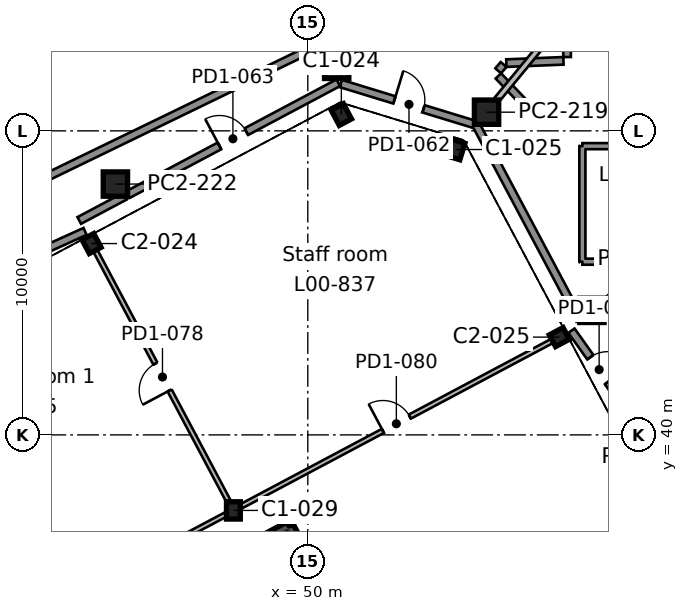
"""IFC4 building model, lengths in metres.
Left out: names, types, materials, properties, quantities, classifications, styles, units other than length and angle.
Written with IfcOpenShell. Run it as: python <this file> out.ifc"""

import sys

from ifc_helpers import new_model, si_unit, direction, frame, frame_2d, origin, origin_2d, place, context, subcontext, project, spatial, rectangle, i_section, extrude, element, fill, save


model = new_model("IFC4")
c1 = context("Model", 3, precision=1e-05, world=origin(), true_north=direction((0.0, 1.0)))
c2 = subcontext(c1, "Body", "Model", "MODEL_VIEW")
j1 = project(units=[si_unit("LENGTHUNIT", "METRE"), si_unit("PLANEANGLEUNIT", "RADIAN")], contexts=[c1])
p1 = place(None, origin())
s1 = spatial("IfcSite", under=j1, at=p1, CompositionType="ELEMENT")
p2 = place(p1, origin())
s2 = spatial("IfcBuilding", under=s1, at=p2, CompositionType="ELEMENT")
p3 = place(p2, origin())
s3 = spatial("IfcBuildingStorey", under=s2, at=p3, CompositionType="ELEMENT", Elevation=0.0)
p4 = place(p3, frame((47.553, 37.516, 0.0), z_axis=(0.0, 0.0, 1.0), x_axis=(1.0, 0.0, 0.0)))
e1 = element("IfcColumn", 1, at=p4, inside=s3, PredefinedType="COLUMN", context=c2, shape_type="SweptSolid", body=[
    extrude(i_section(OverallWidth=0.455, OverallDepth=0.569, WebThickness=0.078, FlangeThickness=0.125, FilletRadius=0.015, at=origin_2d()), origin(), (0.0, 0.0, 1.0), 7.0),
])
for number, where, z_axis, x_axis in (
    (2, (58.272, 43.216, 0.0), (0.0, 0.0, 1.0), (-0.469, 0.883, 0.0)),
    (3, (42.887, 46.293, 0.0), (0.0, 0.0, 1.0), (-0.883, -0.469, 0.0)),
):
    element("IfcColumn", number, at=place(p3, frame(where, z_axis=z_axis, x_axis=x_axis)), inside=s3, PredefinedType="COLUMN", context=c2, shape_type="SweptSolid", body=[
        extrude(i_section(OverallWidth=0.437, OverallDepth=0.513, WebThickness=0.061, FlangeThickness=0.097, FilletRadius=0.015, at=origin_2d()), origin(), (0.0, 0.0, 1.0), 7.0),
    ])
for number, where, z_axis, x_axis in (
    (4, (54.867, 49.386, 0.0), (0.0, 0.0, 1.0), (-0.956, 0.292, 0.0)),
    (5, (51.103, 50.537, 0.0), (0.0, 0.0, 1.0), (-0.883, -0.469, 0.0)),
):
    element("IfcColumn", number, at=place(p3, frame(where, z_axis=z_axis, x_axis=x_axis)), inside=s3, PredefinedType="COLUMN", context=c2, shape_type="SweptSolid", body=[
        extrude(i_section(OverallWidth=0.455, OverallDepth=0.569, WebThickness=0.078, FlangeThickness=0.125, FilletRadius=0.015, at=origin_2d()), origin(), (0.0, 0.0, 1.0), 7.0),
    ])
p5 = place(p3, frame((49.384, 37.004, 0.0), z_axis=(0.0, 0.0, 1.0), x_axis=(0.46946936446, -0.882948761726, 0.0)))
e6 = element("IfcWall", 6, at=p5, inside=s3, PredefinedType="SHEAR", context=c2, shape_type="SweptSolid", body=[
    extrude(rectangle(XDim=3.75, YDim=0.3, at=frame_2d((1.875, 0.0))), origin(), (0.0, 0.0, 1.0), 7.0),
])
p6 = place(p3, frame((42.055, 33.107, 0.0), z_axis=(0.0, 0.0, 1.0), x_axis=(0.882945809314, 0.469474917132, 0.0)))
e7 = element("IfcWall", 7, at=p6, inside=s3, PredefinedType="SHEAR", context=c2, shape_type="SweptSolid", body=[
    extrude(rectangle(XDim=8.3, YDim=0.3, at=frame_2d((4.15, 0.0))), origin(), (0.0, 0.0, 1.0), 7.0),
])
for number, where, z_axis, x_axis in (
    (8, (59.345, 44.096, 0.0), (0.0, 0.0, 1.0), (1.0, 0.0, 0.0)),
    (9, (43.672, 48.25, 0.0), (0.0, 0.0, 1.0), (1.0, 0.0, 0.0)),
    (10, (55.879, 50.614, 0.0), (0.0, 0.0, 1.0), (1.0, 0.0, 0.0)),
    (11, (50.95, 52.121, 0.0), (0.0, 0.0, 1.0), (1.0, 0.0, 0.0)),
):
    element("IfcColumn", number, at=place(p3, frame(where, z_axis=z_axis, x_axis=x_axis)), inside=s3, PredefinedType="COLUMN", context=c2, shape_type="SweptSolid", body=[
        extrude(rectangle(XDim=0.8, YDim=0.8, at=origin_2d()), origin(), (0.0, 0.0, 1.0), 6.37),
    ])
p7 = place(p3, frame((64.104, 50.899, 7.0), z_axis=(0.0, 0.0, 1.0), x_axis=(-0.999557331357, -0.029751324843, 0.0)))
e12 = element("IfcWall", 12, at=p7, inside=s3, PredefinedType="STANDARD", context=c2, shape_type="SweptSolid", body=[
    extrude(rectangle(XDim=6.721, YDim=0.25, at=frame_2d((3.36, 0.0))), origin(), (0.0, 0.0, 1.0), 0.65),
])
p8 = place(p3, frame((57.292, 50.737, 7.0), z_axis=(0.0, 0.0, 1.0), x_axis=(-0.692037764772, 0.721861297016, 0.0)))
e13 = element("IfcWall", 13, at=p8, inside=s3, PredefinedType="STANDARD", context=c2, shape_type="SweptSolid", body=[
    extrude(rectangle(XDim=1.482, YDim=0.25, at=frame_2d((0.741, 0.0))), origin(), (0.0, 0.0, 1.0), 0.65),
])
p9 = place(p3, frame((56.262, 51.974, 7.0), z_axis=(0.0, 0.0, 1.0), x_axis=(0.646899057013, 0.762575642173, 0.0)))
e14 = element("IfcWall", 14, at=p9, inside=s3, PredefinedType="STANDARD", context=c2, shape_type="SweptSolid", body=[
    extrude(rectangle(XDim=0.274, YDim=0.25, at=frame_2d((0.137, 0.0))), origin(), (0.0, 0.0, 1.0), 0.65),
])
p10 = place(p3, frame((56.53, 52.228, 7.0), z_axis=(0.0, 0.0, 1.0), x_axis=(0.999199505682, 0.040004347816, 0.0)))
e15 = element("IfcWall", 15, at=p10, inside=s3, PredefinedType="STANDARD", context=c2, shape_type="SweptSolid", body=[
    extrude(rectangle(XDim=1.88, YDim=0.25, at=frame_2d((0.94, 0.0))), origin(), (0.0, 0.0, 1.0), 0.65),
])
p11 = place(p3, frame((58.528, 52.428, 7.0), z_axis=(0.0, 0.0, 1.0), x_axis=(-0.001096104254, 0.999999399278, 0.0)))
e16 = element("IfcWall", 16, at=p11, inside=s3, PredefinedType="STANDARD", context=c2, shape_type="SweptSolid", body=[
    extrude(rectangle(XDim=6.237, YDim=0.25, at=frame_2d((3.118, 0.0))), origin(), (0.0, 0.0, 1.0), 0.65),
])
p12 = place(p3, frame((51.808, 53.523, 7.0), z_axis=(0.0, 0.0, 1.0), x_axis=(-0.89970966322, -0.436488856569, 0.0)))
e17 = element("IfcWall", 17, at=p12, inside=s3, PredefinedType="STANDARD", context=c2, shape_type="SweptSolid", body=[
    extrude(rectangle(XDim=13.462, YDim=0.25, at=frame_2d((6.731, 0.0))), origin(), (0.0, 0.0, 1.0), 0.65),
])
for number, where, z_axis, x_axis in (
    (18, (62.831, 45.697, 6.92), (0.0, 0.0, 1.0), (-1.0, 0.0, 0.0)),
    (19, (59.031, 45.697, 6.92), (0.0, 0.0, 1.0), (0.0, 1.0, 0.0)),
    (20, (59.031, 49.497, 6.92), (0.0, 0.0, 1.0), (1.0, 0.0, 0.0)),
):
    element("IfcWall", number, at=place(p3, frame(where, z_axis=z_axis, x_axis=x_axis)), inside=s3, PredefinedType="SOLIDWALL", context=c2, shape_type="SweptSolid", body=[
        extrude(rectangle(XDim=3.8, YDim=0.2, at=frame_2d((1.9, 0.0))), origin(), (0.0, 0.0, 1.0), 0.18),
    ])
p13 = place(p3, frame((62.503, 58.649, 0.0), z_axis=(0.0, 0.0, 1.0), x_axis=(-0.636071289124, -0.771630296938, 0.0)))
e21 = element("IfcWall", 21, at=p13, inside=s3, PredefinedType="PARTITIONING", context=c2, shape_type="SweptSolid", body=[
    extrude(rectangle(XDim=9.895, YDim=0.2, at=frame_2d((4.947, 0.0))), origin(), (0.0, 0.0, 1.0), 6.37),
])
p14 = place(p3, frame((58.672, 43.428, 0.0), z_axis=(0.0, 0.0, 1.0), x_axis=(0.578928632739, -0.815378217881, 0.0)))
e22 = element("IfcWall", 22, at=p14, inside=s3, PredefinedType="SOLIDWALL", context=c2, shape_type="SweptSolid", body=[
    extrude(rectangle(XDim=3.143, YDim=0.25, at=frame_2d((1.572, 0.0))), origin(), (0.0, 0.0, 1.0), 6.37),
])
p15 = place(p14, frame((1.072, 0.0, 0.0)))
e23 = element("IfcOpeningElement", 23, at=p15, cuts=e22, PredefinedType="OPENING", context=c2, shape_type="SweptSolid", body=[
    extrude(rectangle(XDim=1.0, YDim=2.1, at=frame_2d((0.5, 1.05))), frame((0.0, 0.135, 0.0), z_axis=(0.0, -1.0, 0.0), x_axis=(1.0, 0.0, 0.0)), (0.0, 0.0, 1.0), 0.27),
])
p16 = place(p3, frame((55.535, 50.196, 0.0), z_axis=(0.0, 0.0, 1.0), x_axis=(0.469471385401, -0.882947687176, 0.0)))
e24 = element("IfcWall", 24, at=p16, inside=s3, PredefinedType="SOLIDWALL", context=c2, shape_type="SweptSolid", body=[
    extrude(rectangle(XDim=7.264, YDim=0.25, at=frame_2d((3.632, 0.0))), origin(), (0.0, 0.0, 1.0), 6.37),
])
p17 = place(p3, frame((52.168, 61.898, 0.0), z_axis=(0.0, 0.0, 1.0), x_axis=(-0.100124403506, -0.994974926228, 0.0)))
e25 = element("IfcWall", 25, at=p17, inside=s3, PredefinedType="PARTITIONING", context=c2, shape_type="SweptSolid", body=[
    extrude(rectangle(XDim=9.424, YDim=0.2, at=frame_2d((4.712, 0.0))), origin(), (0.0, 0.0, 1.0), 6.37),
])
p18 = place(p3, frame((51.087, 51.556, 0.0), z_axis=(0.0, 0.0, 1.0), x_axis=(0.956310816829, -0.292351879788, 0.0)))
e26 = element("IfcWall", 26, at=p18, inside=s3, PredefinedType="SOLIDWALL", context=c2, shape_type="SweptSolid", body=[
    extrude(rectangle(XDim=4.651, YDim=0.25, at=frame_2d((2.326, 0.0))), origin(), (0.0, 0.0, 1.0), 6.37),
])
p19 = place(p18, frame((1.844, 0.0, 0.0)))
e27 = element("IfcOpeningElement", 27, at=p19, cuts=e26, PredefinedType="OPENING", context=c2, shape_type="SweptSolid", body=[
    extrude(rectangle(XDim=1.0, YDim=2.1, at=frame_2d((0.5, 1.05))), frame((0.0, 0.135, 0.0), z_axis=(0.0, -1.0, 0.0), x_axis=(1.0, 0.0, 0.0)), (0.0, 0.0, 1.0), 0.27),
])
p20 = place(p3, frame((36.793, 44.027, 0.0), z_axis=(0.0, 0.0, 1.0), x_axis=(0.910758391685, 0.412939646892, 0.0)))
e28 = element("IfcWall", 28, at=p20, inside=s3, PredefinedType="SOLIDWALL", context=c2, shape_type="SweptSolid", body=[
    extrude(rectangle(XDim=6.457, YDim=0.25, at=frame_2d((3.229, 0.0))), origin(), (0.0, 0.0, 1.0), 6.37),
])
p21 = place(p3, frame((42.483, 47.052, 0.0), z_axis=(0.0, 0.0, 1.0), x_axis=(0.882940813988, 0.469484311766, 0.0)))
e29 = element("IfcWall", 29, at=p21, inside=s3, PredefinedType="SOLIDWALL", context=c2, shape_type="SweptSolid", body=[
    extrude(rectangle(XDim=1.699, YDim=0.25, at=frame_2d((0.85, 0.0))), origin(), (0.0, 0.0, 1.0), 6.37),
])
p22 = place(p3, frame((44.072, 47.897, 0.0), z_axis=(0.0, 0.0, 1.0), x_axis=(0.882948932855, 0.469469042612, 0.0)))
e30 = element("IfcWall", 30, at=p22, inside=s3, PredefinedType="SOLIDWALL", context=c2, shape_type="SweptSolid", body=[
    extrude(rectangle(XDim=7.849, YDim=0.25, at=frame_2d((3.924, 0.0))), origin(), (0.0, 0.0, 1.0), 6.37),
])
p23 = place(p22, frame((3.424, 0.0, 0.0)))
e31 = element("IfcOpeningElement", 31, at=p23, cuts=e30, PredefinedType="OPENING", context=c2, shape_type="SweptSolid", body=[
    extrude(rectangle(XDim=1.0, YDim=2.1, at=frame_2d((0.5, 1.05))), frame((0.0, 0.135, 0.0), z_axis=(0.0, -1.0, 0.0), x_axis=(1.0, 0.0, 0.0)), (0.0, 0.0, 1.0), 0.27),
])
p24 = place(p3, frame((47.291, 37.376, 0.0), z_axis=(0.0, 0.0, 1.0), x_axis=(-0.882950155787, -0.469466742588, 0.0)))
e32 = element("IfcWall", 32, at=p24, inside=s3, PredefinedType="PARTITIONING", context=c2, shape_type="SweptSolid", body=[
    extrude(rectangle(XDim=8.002, YDim=0.15, at=frame_2d((4.001, 0.0))), origin(), (0.0, 0.0, 1.0), 6.55),
])
p25 = place(p3, frame((58.046, 43.095, 0.0), z_axis=(0.0, 0.0, 1.0), x_axis=(-0.882944872937, -0.469476678179, 0.0)))
e33 = element("IfcWall", 33, at=p25, inside=s3, PredefinedType="PARTITIONING", context=c2, shape_type="SweptSolid", body=[
    extrude(rectangle(XDim=11.586, YDim=0.15, at=frame_2d((5.793, 0.0))), origin(), (0.0, 0.0, 1.0), 6.55),
])
p26 = place(p25, frame((5.314, 0.0, 0.0)))
e34 = element("IfcOpeningElement", 34, at=p26, cuts=e33, PredefinedType="OPENING", context=c2, shape_type="SweptSolid", body=[
    extrude(rectangle(XDim=1.0, YDim=2.1, at=frame_2d((0.5, 1.05))), frame((0.0, 0.085, 0.0), z_axis=(0.0, -1.0, 0.0), x_axis=(1.0, 0.0, 0.0)), (0.0, 0.0, 1.0), 0.17),
])
p27 = place(p3, frame((47.385, 37.832, 0.0), z_axis=(0.0, 0.0, 1.0), x_axis=(-0.469472297485, 0.882947202212, 0.0)))
e35 = element("IfcWall", 35, at=p27, inside=s3, PredefinedType="PARTITIONING", context=c2, shape_type="SweptSolid", body=[
    extrude(rectangle(XDim=9.326, YDim=0.15, at=frame_2d((4.663, 0.0))), origin(), (0.0, 0.0, 1.0), 6.55),
])
p28 = place(p27, frame((4.112, 0.0, 0.0)))
e36 = element("IfcOpeningElement", 36, at=p28, cuts=e35, PredefinedType="OPENING", context=c2, shape_type="SweptSolid", body=[
    extrude(rectangle(XDim=1.0, YDim=2.1, at=frame_2d((0.5, 1.05))), frame((0.0, 0.085, 0.0), z_axis=(0.0, -1.0, 0.0), x_axis=(1.0, 0.0, 0.0)), (0.0, 0.0, 1.0), 0.17),
])
p29 = place(p3, frame((0.0, 0.0, 6.37)))
p30 = place(p29, frame((60.931, 47.597, 0.0)))
p31 = place(p30, frame((0.0, 0.0, 0.5)))
e37 = element("IfcWindow", 37, at=p31, inside=s3, PartitioningType="SINGLE_PANEL", PredefinedType="SKYLIGHT", context=c2, shape_type="SweptSolid", body=[
    extrude(rectangle(XDim=3.6, YDim=3.6, at=origin_2d()), origin(), (0.0, 0.0, 1.0), 0.05),
])
p32 = place(p26, frame((1.0, 0.0, 0.0), z_axis=(0.0, 0.0, 1.0), x_axis=(-1.0, 0.0, 0.0)))
e38 = element("IfcDoor", 38, at=p32, inside=s3, OperationType="SINGLE_SWING_LEFT", PredefinedType="DOOR", context=c2, shape_type="SweptSolid", body=[
    extrude(rectangle(XDim=1.0, YDim=2.1, at=frame_2d((0.5, 1.05))), frame((0.0, 0.025, 0.0), z_axis=(0.0, -1.0, 0.0), x_axis=(1.0, 0.0, 0.0)), (0.0, 0.0, 1.0), 0.05),
])
fill(e34, e38)
p33 = place(p15, origin())
e39 = element("IfcDoor", 39, at=p33, inside=s3, OperationType="SINGLE_SWING_RIGHT", PredefinedType="DOOR", context=c2, shape_type="SweptSolid", body=[
    extrude(rectangle(XDim=1.0, YDim=2.1, at=frame_2d((0.5, 1.05))), frame((0.0, 0.025, 0.0), z_axis=(0.0, -1.0, 0.0), x_axis=(1.0, 0.0, 0.0)), (0.0, 0.0, 1.0), 0.05),
])
fill(e23, e39)
p34 = place(p28, origin())
e40 = element("IfcDoor", 40, at=p34, inside=s3, OperationType="SINGLE_SWING_LEFT", PredefinedType="DOOR", context=c2, shape_type="SweptSolid", body=[
    extrude(rectangle(XDim=1.0, YDim=2.1, at=frame_2d((0.5, 1.05))), frame((0.0, 0.025, 0.0), z_axis=(0.0, -1.0, 0.0), x_axis=(1.0, 0.0, 0.0)), (0.0, 0.0, 1.0), 0.05),
])
fill(e36, e40)
p35 = place(p23, origin())
e41 = element("IfcDoor", 41, at=p35, inside=s3, OperationType="SINGLE_SWING_LEFT", PredefinedType="DOOR", context=c2, shape_type="SweptSolid", body=[
    extrude(rectangle(XDim=1.0, YDim=2.1, at=frame_2d((0.5, 1.05))), frame((0.0, 0.025, 0.0), z_axis=(0.0, -1.0, 0.0), x_axis=(1.0, 0.0, 0.0)), (0.0, 0.0, 1.0), 0.05),
])
fill(e31, e41)
p36 = place(p19, origin())
e42 = element("IfcDoor", 42, at=p36, inside=s3, OperationType="SINGLE_SWING_LEFT", PredefinedType="DOOR", context=c2, shape_type="SweptSolid", body=[
    extrude(rectangle(XDim=1.0, YDim=2.1, at=frame_2d((0.5, 1.05))), frame((0.0, 0.025, 0.0), z_axis=(0.0, -1.0, 0.0), x_axis=(1.0, 0.0, 0.0)), (0.0, 0.0, 1.0), 0.05),
])
fill(e27, e42)
save(model, sys.argv[1])
